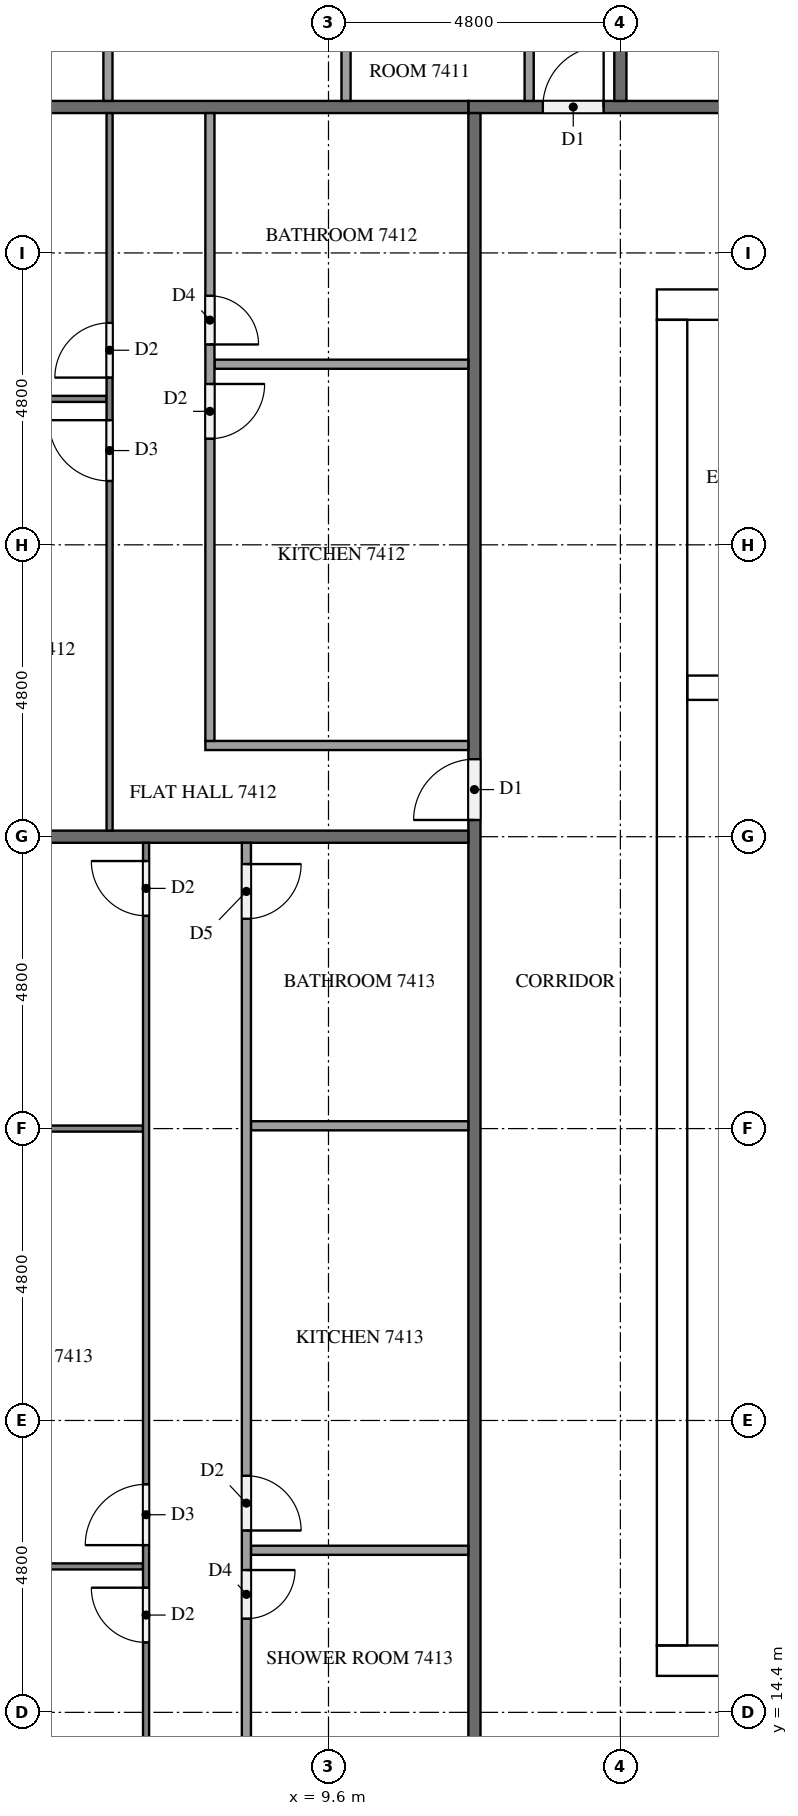
"""IFC4 building model, lengths in metres.
Left out: names, types, materials, properties, quantities, classifications, styles, units other than length and angle.
Written with IfcOpenShell. Run it as: python <this file> out.ifc"""

import sys

from ifc_helpers import new_model, si_unit, direction, frame, frame_2d, origin, place, context, subcontext, project, spatial, rectangle, extrude, element, fill, save


model = new_model("IFC4")
c1 = context("Model", 3, precision=1e-05, world=origin(), true_north=direction((0.0, 1.0)))
c2 = subcontext(c1, "Body", "Model", "MODEL_VIEW")
j1 = project(units=[si_unit("LENGTHUNIT", "METRE"), si_unit("PLANEANGLEUNIT", "RADIAN")], contexts=[c1])
p1 = place(None, origin())
s1 = spatial("IfcSite", under=j1, at=p1, CompositionType="ELEMENT")
p2 = place(p1, origin())
s2 = spatial("IfcBuilding", under=s1, at=p2, CompositionType="ELEMENT")
p3 = place(p2, frame((0.0, 0.0, 282.6)))
s3 = spatial("IfcBuildingStorey", under=s2, at=p3, CompositionType="ELEMENT", Elevation=282.6)
p4 = place(p3, frame((15.0, 15.25, 0.0), z_axis=(0.0, 0.0, 1.0), x_axis=(1.0, 0.0, 0.0)))
e1 = element("IfcWall", 1, at=p4, inside=s3, PredefinedType="SHEAR", context=c2, shape_type="SweptSolid", body=[
    extrude(rectangle(XDim=32.4, YDim=0.5, at=frame_2d((16.2, 0.0))), origin(), (0.0, 0.0, 1.0), 3.2),
])
p5 = place(p4, frame((15.3, 0.0, 0.0)))
e2 = element("IfcOpeningElement", 2, at=p5, cuts=e1, PredefinedType="OPENING", context=c2, shape_type="SweptSolid", body=[
    extrude(rectangle(XDim=1.8, YDim=2.1, at=frame_2d((0.9, 1.05))), frame((0.0, 0.26, 0.0), z_axis=(0.0, -1.0, 0.0), x_axis=(1.0, 0.0, 0.0)), (0.0, 0.0, 1.0), 0.52),
])
p6 = place(p3, frame((15.0, 37.55, 0.0), z_axis=(0.0, 0.0, 1.0), x_axis=(1.0, 0.0, 0.0)))
e3 = element("IfcWall", 3, at=p6, inside=s3, PredefinedType="SHEAR", context=c2, shape_type="SweptSolid", body=[
    extrude(rectangle(XDim=32.4, YDim=0.5, at=frame_2d((16.2, 0.0))), origin(), (0.0, 0.0, 1.0), 3.2),
])
p7 = place(p6, frame((15.3, 0.0, 0.0)))
e4 = element("IfcOpeningElement", 4, at=p7, cuts=e3, PredefinedType="OPENING", context=c2, shape_type="SweptSolid", body=[
    extrude(rectangle(XDim=1.8, YDim=2.1, at=frame_2d((0.9, 1.05))), frame((0.0, 0.26, 0.0), z_axis=(0.0, -1.0, 0.0), x_axis=(1.0, 0.0, 0.0)), (0.0, 0.0, 1.0), 0.52),
])
p8 = place(p6, frame((1.282, 0.0, 0.0)))
e5 = element("IfcOpeningElement", 5, at=p8, cuts=e3, PredefinedType="OPENING", context=c2, shape_type="SweptSolid", body=[
    extrude(rectangle(XDim=1.0, YDim=2.1, at=frame_2d((0.5, 1.05))), frame((0.0, 0.26, 0.0), z_axis=(0.0, -1.0, 0.0), x_axis=(1.0, 0.0, 0.0)), (0.0, 0.0, 1.0), 0.52),
])
p9 = place(p6, frame((5.082, 0.0, 0.0)))
e6 = element("IfcOpeningElement", 6, at=p9, cuts=e3, PredefinedType="OPENING", context=c2, shape_type="SweptSolid", body=[
    extrude(rectangle(XDim=1.0, YDim=2.1, at=frame_2d((0.5, 1.05))), frame((0.0, 0.26, 0.0), z_axis=(0.0, -1.0, 0.0), x_axis=(1.0, 0.0, 0.0)), (0.0, 0.0, 1.0), 0.52),
])
p10 = place(p3, frame((15.25, 15.5, 0.0), z_axis=(0.0, 0.0, 1.0), x_axis=(0.0, 1.0, 0.0)))
e7 = element("IfcWall", 7, at=p10, inside=s3, PredefinedType="SHEAR", context=c2, shape_type="SweptSolid", body=[
    extrude(rectangle(XDim=21.8, YDim=0.5, at=frame_2d((10.9, 0.0))), origin(), (0.0, 0.0, 1.0), 3.2),
])
p11 = place(p10, frame((5.26, 0.0, 0.0)))
e8 = element("IfcOpeningElement", 8, at=p11, cuts=e7, PredefinedType="OPENING", context=c2, shape_type="SweptSolid", body=[
    extrude(rectangle(XDim=1.2, YDim=2.1, at=frame_2d((0.6, 1.05))), frame((0.0, 0.26, 0.0), z_axis=(0.0, -1.0, 0.0), x_axis=(1.0, 0.0, 0.0)), (0.0, 0.0, 1.0), 0.52),
])
p12 = place(p3, frame((15.5, 31.25, 0.0), z_axis=(0.0, 0.0, 1.0), x_axis=(1.0, 0.0, 0.0)))
e9 = element("IfcWall", 9, at=p12, inside=s3, PredefinedType="SHEAR", context=c2, shape_type="SweptSolid", body=[
    extrude(rectangle(XDim=7.4, YDim=0.4, at=frame_2d((3.7, 0.0))), origin(), (0.0, 0.0, 1.0), 3.2),
])
p13 = place(p3, frame((11.9, 40.8, 0.0), z_axis=(0.0, 0.0, 1.0), x_axis=(1.0, 0.0, 0.0)))
e10 = element("IfcWall", 10, at=p13, inside=s3, PredefinedType="PARTITIONING", context=c2, shape_type="SweptSolid", body=[
    extrude(rectangle(XDim=38.6, YDim=0.2, at=frame_2d((19.3, 0.0))), origin(), (0.0, 0.0, 1.0), 3.2),
])
p14 = place(p13, frame((33.975, 0.0, 0.0)))
e11 = element("IfcOpeningElement", 11, at=p14, cuts=e10, PredefinedType="OPENING", context=c2, shape_type="SweptSolid", body=[
    extrude(rectangle(XDim=1.0, YDim=2.1, at=frame_2d((0.5, 1.05))), frame((0.0, 0.11, 0.0), z_axis=(0.0, -1.0, 0.0), x_axis=(1.0, 0.0, 0.0)), (0.0, 0.0, 1.0), 0.22),
])
p15 = place(p13, frame((14.725, 0.0, 0.0)))
e12 = element("IfcOpeningElement", 12, at=p15, cuts=e10, PredefinedType="OPENING", context=c2, shape_type="SweptSolid", body=[
    extrude(rectangle(XDim=1.1, YDim=2.1, at=frame_2d((0.55, 1.05))), frame((0.0, 0.11, 0.0), z_axis=(0.0, -1.0, 0.0), x_axis=(1.0, 0.0, 0.0)), (0.0, 0.0, 1.0), 0.22),
])
p16 = place(p13, frame((13.225, 0.0, 0.0)))
e13 = element("IfcOpeningElement", 13, at=p16, cuts=e10, PredefinedType="OPENING", context=c2, shape_type="SweptSolid", body=[
    extrude(rectangle(XDim=1.0, YDim=2.1, at=frame_2d((0.5, 1.05))), frame((0.0, 0.11, 0.0), z_axis=(0.0, -1.0, 0.0), x_axis=(1.0, 0.0, 0.0)), (0.0, 0.0, 1.0), 0.22),
])
p17 = place(p13, frame((1.225, 0.0, 0.0)))
e14 = element("IfcOpeningElement", 14, at=p17, cuts=e10, PredefinedType="OPENING", context=c2, shape_type="SweptSolid", body=[
    extrude(rectangle(XDim=1.0, YDim=2.1, at=frame_2d((0.5, 1.05))), frame((0.0, 0.11, 0.0), z_axis=(0.0, -1.0, 0.0), x_axis=(1.0, 0.0, 0.0)), (0.0, 0.0, 1.0), 0.22),
])
p18 = place(p3, frame((12.0, 12.1, 0.0), z_axis=(0.0, 0.0, 1.0), x_axis=(0.0, 1.0, 0.0)))
e15 = element("IfcWall", 15, at=p18, inside=s3, PredefinedType="PARTITIONING", context=c2, shape_type="SweptSolid", body=[
    extrude(rectangle(XDim=28.6, YDim=0.2, at=frame_2d((14.3, 0.0))), origin(), (0.0, 0.0, 1.0), 3.2),
])
p19 = place(p18, frame((16.975, 0.0, 0.0)))
e16 = element("IfcOpeningElement", 16, at=p19, cuts=e15, PredefinedType="OPENING", context=c2, shape_type="SweptSolid", body=[
    extrude(rectangle(XDim=1.0, YDim=2.1, at=frame_2d((0.5, 1.05))), frame((0.0, 0.11, 0.0), z_axis=(0.0, -1.0, 0.0), x_axis=(1.0, 0.0, 0.0)), (0.0, 0.0, 1.0), 0.22),
])
p20 = place(p18, frame((0.175, 0.0, 0.0)))
e17 = element("IfcOpeningElement", 17, at=p20, cuts=e15, PredefinedType="OPENING", context=c2, shape_type="SweptSolid", body=[
    extrude(rectangle(XDim=1.0, YDim=2.1, at=frame_2d((0.5, 1.05))), frame((0.0, 0.11, 0.0), z_axis=(0.0, -1.0, 0.0), x_axis=(1.0, 0.0, 0.0)), (0.0, 0.0, 1.0), 0.22),
])
p21 = place(p3, frame((14.4, 47.75, 0.0), z_axis=(0.0, 0.0, 1.0), x_axis=(0.0, -1.0, 0.0)))
e18 = element("IfcWall", 18, at=p21, inside=s3, PredefinedType="PARTITIONING", context=c2, shape_type="SweptSolid", body=[
    extrude(rectangle(XDim=6.85, YDim=0.2, at=frame_2d((3.425, 0.0))), origin(), (0.0, 0.0, 1.0), 3.2),
])
for number, where, z_axis, x_axis in (
    (19, (0.1, 40.8, 0.0), (0.0, 0.0, 1.0), (1.0, 0.0, 0.0)),
    (20, (0.1, 28.8, 0.0), (0.0, 0.0, 1.0), (1.0, 0.0, 0.0)),
):
    element("IfcWall", number, at=place(p3, frame(where, z_axis=z_axis, x_axis=x_axis)), inside=s3, PredefinedType="PARTITIONING", context=c2, shape_type="SweptSolid", body=[
        extrude(rectangle(XDim=11.8, YDim=0.2, at=frame_2d((5.9, 0.0))), origin(), (0.0, 0.0, 1.0), 3.2),
    ])
for number, where, z_axis, x_axis in (
    (21, (9.888, 40.9, 0.0), (0.0, 0.0, 1.0), (0.0, 1.0, 0.0)),
    (22, (5.973, 40.9, 0.0), (0.0, 0.0, 1.0), (0.0, 1.0, 0.0)),
):
    element("IfcWall", number, at=place(p3, frame(where, z_axis=z_axis, x_axis=x_axis)), inside=s3, PredefinedType="PARTITIONING", context=c2, shape_type="SweptSolid", body=[
        extrude(rectangle(XDim=1.925, YDim=0.15, at=frame_2d((0.962, 0.0))), origin(), (0.0, 0.0, 1.0), 3.2),
    ])
p22 = place(p3, frame((12.9, 40.9, 0.0), z_axis=(0.0, 0.0, 1.0), x_axis=(0.0, 1.0, 0.0)))
e23 = element("IfcWall", 23, at=p22, inside=s3, PredefinedType="PARTITIONING", context=c2, shape_type="SweptSolid", body=[
    extrude(rectangle(XDim=2.075, YDim=0.15, at=frame_2d((1.038, 0.0))), origin(), (0.0, 0.0, 1.0), 3.2),
])
p23 = place(p3, frame((5.95, 36.0, 0.0), z_axis=(0.0, 0.0, 1.0), x_axis=(-1.0, 0.0, 0.0)))
e24 = element("IfcWall", 24, at=p23, inside=s3, PredefinedType="PARTITIONING", context=c2, shape_type="SweptSolid", body=[
    extrude(rectangle(XDim=5.85, YDim=0.1, at=frame_2d((2.925, 0.0))), origin(), (0.0, 0.0, 1.0), 3.2),
])
p24 = place(p3, frame((6.0, 28.9, 0.0), z_axis=(0.0, 0.0, 1.0), x_axis=(0.0, 1.0, 0.0)))
e25 = element("IfcWall", 25, at=p24, inside=s3, PredefinedType="PARTITIONING", context=c2, shape_type="SweptSolid", body=[
    extrude(rectangle(XDim=11.8, YDim=0.1, at=frame_2d((5.9, 0.0))), origin(), (0.0, 0.0, 1.0), 3.2),
])
p25 = place(p24, frame((5.75, 0.0, 0.0)))
e26 = element("IfcOpeningElement", 26, at=p25, cuts=e25, PredefinedType="OPENING", context=c2, shape_type="SweptSolid", body=[
    extrude(rectangle(XDim=1.0, YDim=2.1, at=frame_2d((0.5, 1.05))), frame((0.0, 0.06, 0.0), z_axis=(0.0, -1.0, 0.0), x_axis=(1.0, 0.0, 0.0)), (0.0, 0.0, 1.0), 0.12),
])
p26 = place(p24, frame((7.45, 0.0, 0.0)))
e27 = element("IfcOpeningElement", 27, at=p26, cuts=e25, PredefinedType="OPENING", context=c2, shape_type="SweptSolid", body=[
    extrude(rectangle(XDim=0.9, YDim=2.1, at=frame_2d((0.45, 1.05))), frame((0.0, 0.06, 0.0), z_axis=(0.0, -1.0, 0.0), x_axis=(1.0, 0.0, 0.0)), (0.0, 0.0, 1.0), 0.12),
])
p27 = place(p3, frame((11.9, 36.57, 0.0), z_axis=(0.0, 0.0, 1.0), x_axis=(-1.0, 0.0, 0.0)))
e28 = element("IfcWall", 28, at=p27, inside=s3, PredefinedType="PARTITIONING", context=c2, shape_type="SweptSolid", body=[
    extrude(rectangle(XDim=4.175, YDim=0.15, at=frame_2d((2.087, 0.0))), origin(), (0.0, 0.0, 1.0), 3.2),
])
p28 = place(p3, frame((11.9, 30.3, 0.0), z_axis=(0.0, 0.0, 1.0), x_axis=(-1.0, 0.0, 0.0)))
e29 = element("IfcWall", 29, at=p28, inside=s3, PredefinedType="PARTITIONING", context=c2, shape_type="SweptSolid", body=[
    extrude(rectangle(XDim=4.325, YDim=0.15, at=frame_2d((2.163, 0.0))), origin(), (0.0, 0.0, 1.0), 3.2),
])
p29 = place(p3, frame((7.65, 40.7, 0.0), z_axis=(0.0, 0.0, 1.0), x_axis=(0.0, -1.0, 0.0)))
e30 = element("IfcWall", 30, at=p29, inside=s3, PredefinedType="PARTITIONING", context=c2, shape_type="SweptSolid", body=[
    extrude(rectangle(XDim=10.325, YDim=0.15, at=frame_2d((5.163, 0.0))), origin(), (0.0, 0.0, 1.0), 3.2),
])
p30 = place(p29, frame((4.455, 0.0, 0.0)))
e31 = element("IfcOpeningElement", 31, at=p30, cuts=e30, PredefinedType="OPENING", context=c2, shape_type="SweptSolid", body=[
    extrude(rectangle(XDim=0.9, YDim=2.1, at=frame_2d((0.45, 1.05))), frame((0.0, 0.085, 0.0), z_axis=(0.0, -1.0, 0.0), x_axis=(1.0, 0.0, 0.0)), (0.0, 0.0, 1.0), 0.17),
])
p31 = place(p29, frame((3.005, 0.0, 0.0)))
e32 = element("IfcOpeningElement", 32, at=p31, cuts=e30, PredefinedType="OPENING", context=c2, shape_type="SweptSolid", body=[
    extrude(rectangle(XDim=0.8, YDim=2.1, at=frame_2d((0.4, 1.05))), frame((0.0, 0.085, 0.0), z_axis=(0.0, -1.0, 0.0), x_axis=(1.0, 0.0, 0.0)), (0.0, 0.0, 1.0), 0.17),
])
p32 = place(p3, frame((6.55, 16.8, 0.0), z_axis=(0.0, 0.0, 1.0), x_axis=(-1.0, 0.0, 0.0)))
e33 = element("IfcWall", 33, at=p32, inside=s3, PredefinedType="PARTITIONING", context=c2, shape_type="SweptSolid", body=[
    extrude(rectangle(XDim=6.45, YDim=0.1, at=frame_2d((3.225, 0.0))), origin(), (0.0, 0.0, 1.0), 3.2),
])
p33 = place(p3, frame((6.55, 24.0, 0.0), z_axis=(0.0, 0.0, 1.0), x_axis=(-1.0, 0.0, 0.0)))
e34 = element("IfcWall", 34, at=p33, inside=s3, PredefinedType="PARTITIONING", context=c2, shape_type="SweptSolid", body=[
    extrude(rectangle(XDim=6.3, YDim=0.1, at=frame_2d((3.15, 0.0))), origin(), (0.0, 0.0, 1.0), 3.2),
])
p34 = place(p3, frame((6.6, 12.1, 0.0), z_axis=(0.0, 0.0, 1.0), x_axis=(0.0, 1.0, 0.0)))
e35 = element("IfcWall", 35, at=p34, inside=s3, PredefinedType="PARTITIONING", context=c2, shape_type="SweptSolid", body=[
    extrude(rectangle(XDim=16.6, YDim=0.1, at=frame_2d((8.3, 0.0))), origin(), (0.0, 0.0, 1.0), 3.2),
])
p35 = place(p34, frame((3.45, 0.0, 0.0)))
e36 = element("IfcOpeningElement", 36, at=p35, cuts=e35, PredefinedType="OPENING", context=c2, shape_type="SweptSolid", body=[
    extrude(rectangle(XDim=0.9, YDim=2.1, at=frame_2d((0.45, 1.05))), frame((0.0, 0.06, 0.0), z_axis=(0.0, -1.0, 0.0), x_axis=(1.0, 0.0, 0.0)), (0.0, 0.0, 1.0), 0.12),
])
p36 = place(p34, frame((5.05, 0.0, 0.0)))
e37 = element("IfcOpeningElement", 37, at=p36, cuts=e35, PredefinedType="OPENING", context=c2, shape_type="SweptSolid", body=[
    extrude(rectangle(XDim=1.0, YDim=2.1, at=frame_2d((0.5, 1.05))), frame((0.0, 0.06, 0.0), z_axis=(0.0, -1.0, 0.0), x_axis=(1.0, 0.0, 0.0)), (0.0, 0.0, 1.0), 0.12),
])
p37 = place(p34, frame((15.4, 0.0, 0.0)))
e38 = element("IfcOpeningElement", 38, at=p37, cuts=e35, PredefinedType="OPENING", context=c2, shape_type="SweptSolid", body=[
    extrude(rectangle(XDim=0.9, YDim=2.1, at=frame_2d((0.45, 1.05))), frame((0.0, 0.06, 0.0), z_axis=(0.0, -1.0, 0.0), x_axis=(1.0, 0.0, 0.0)), (0.0, 0.0, 1.0), 0.12),
])
for number, where, z_axis, x_axis in (
    (39, (11.9, 17.065, 0.0), (0.0, 0.0, 1.0), (-1.0, 0.0, 0.0)),
    (40, (11.9, 24.046, 0.0), (0.0, 0.0, 1.0), (-1.0, 0.0, 0.0)),
):
    element("IfcWall", number, at=place(p3, frame(where, z_axis=z_axis, x_axis=x_axis)), inside=s3, PredefinedType="PARTITIONING", context=c2, shape_type="SweptSolid", body=[
        extrude(rectangle(XDim=3.575, YDim=0.15, at=frame_2d((1.788, 0.0))), origin(), (0.0, 0.0, 1.0), 3.2),
    ])
p38 = place(p3, frame((8.25, 28.7, 0.0), z_axis=(0.0, 0.0, 1.0), x_axis=(0.0, -1.0, 0.0)))
e41 = element("IfcWall", 41, at=p38, inside=s3, PredefinedType="PARTITIONING", context=c2, shape_type="SweptSolid", body=[
    extrude(rectangle(XDim=15.125, YDim=0.15, at=frame_2d((7.562, 0.0))), origin(), (0.0, 0.0, 1.0), 3.2),
])
p39 = place(p38, frame((11.96, 0.0, 0.0)))
e42 = element("IfcOpeningElement", 42, at=p39, cuts=e41, PredefinedType="OPENING", context=c2, shape_type="SweptSolid", body=[
    extrude(rectangle(XDim=0.8, YDim=2.1, at=frame_2d((0.4, 1.05))), frame((0.0, 0.085, 0.0), z_axis=(0.0, -1.0, 0.0), x_axis=(1.0, 0.0, 0.0)), (0.0, 0.0, 1.0), 0.17),
])
p40 = place(p38, frame((10.41, 0.0, 0.0)))
e43 = element("IfcOpeningElement", 43, at=p40, cuts=e41, PredefinedType="OPENING", context=c2, shape_type="SweptSolid", body=[
    extrude(rectangle(XDim=0.9, YDim=2.1, at=frame_2d((0.45, 1.05))), frame((0.0, 0.085, 0.0), z_axis=(0.0, -1.0, 0.0), x_axis=(1.0, 0.0, 0.0)), (0.0, 0.0, 1.0), 0.17),
])
p41 = place(p38, frame((0.35, 0.0, 0.0)))
e44 = element("IfcOpeningElement", 44, at=p41, cuts=e41, PredefinedType="OPENING", context=c2, shape_type="SweptSolid", body=[
    extrude(rectangle(XDim=0.9, YDim=2.1, at=frame_2d((0.45, 1.05))), frame((0.0, 0.085, 0.0), z_axis=(0.0, -1.0, 0.0), x_axis=(1.0, 0.0, 0.0)), (0.0, 0.0, 1.0), 0.17),
])
p42 = place(p11, frame((1.2, 0.0, 0.0), z_axis=(0.0, 0.0, 1.0), x_axis=(-1.0, 0.0, 0.0)))
e45 = element("IfcDoor", 45, at=p42, inside=s3, OperationType="SINGLE_SWING_LEFT", PredefinedType="DOOR", context=c2, shape_type="SweptSolid", body=[
    extrude(rectangle(XDim=1.2, YDim=2.1, at=frame_2d((0.6, 1.05))), frame((0.0, 0.025, 0.0), z_axis=(0.0, -1.0, 0.0), x_axis=(1.0, 0.0, 0.0)), (0.0, 0.0, 1.0), 0.05),
])
fill(e8, e45)
p43 = place(p17, origin())
e46 = element("IfcDoor", 46, at=p43, inside=s3, OperationType="SINGLE_SWING_RIGHT", PredefinedType="DOOR", context=c2, shape_type="SweptSolid", body=[
    extrude(rectangle(XDim=1.0, YDim=2.1, at=frame_2d((0.5, 1.05))), frame((0.0, 0.025, 0.0), z_axis=(0.0, -1.0, 0.0), x_axis=(1.0, 0.0, 0.0)), (0.0, 0.0, 1.0), 0.05),
])
fill(e14, e46)
p44 = place(p19, origin())
e47 = element("IfcDoor", 47, at=p44, inside=s3, OperationType="SINGLE_SWING_LEFT", PredefinedType="DOOR", context=c2, shape_type="SweptSolid", body=[
    extrude(rectangle(XDim=1.0, YDim=2.1, at=frame_2d((0.5, 1.05))), frame((0.0, 0.025, 0.0), z_axis=(0.0, -1.0, 0.0), x_axis=(1.0, 0.0, 0.0)), (0.0, 0.0, 1.0), 0.05),
])
fill(e16, e47)
p45 = place(p25, origin())
e48 = element("IfcDoor", 48, at=p45, inside=s3, OperationType="SINGLE_SWING_RIGHT", PredefinedType="DOOR", context=c2, shape_type="SweptSolid", body=[
    extrude(rectangle(XDim=1.0, YDim=2.1, at=frame_2d((0.5, 1.05))), frame((0.0, 0.025, 0.0), z_axis=(0.0, -1.0, 0.0), x_axis=(1.0, 0.0, 0.0)), (0.0, 0.0, 1.0), 0.05),
])
fill(e26, e48)
p46 = place(p26, origin())
e49 = element("IfcDoor", 49, at=p46, inside=s3, OperationType="SINGLE_SWING_LEFT", PredefinedType="DOOR", context=c2, shape_type="SweptSolid", body=[
    extrude(rectangle(XDim=0.9, YDim=2.1, at=frame_2d((0.45, 1.05))), frame((0.0, 0.025, 0.0), z_axis=(0.0, -1.0, 0.0), x_axis=(1.0, 0.0, 0.0)), (0.0, 0.0, 1.0), 0.05),
])
fill(e27, e49)
p47 = place(p30, origin())
e50 = element("IfcDoor", 50, at=p47, inside=s3, OperationType="SINGLE_SWING_LEFT", PredefinedType="DOOR", context=c2, shape_type="SweptSolid", body=[
    extrude(rectangle(XDim=0.9, YDim=2.1, at=frame_2d((0.45, 1.05))), frame((0.0, 0.025, 0.0), z_axis=(0.0, -1.0, 0.0), x_axis=(1.0, 0.0, 0.0)), (0.0, 0.0, 1.0), 0.05),
])
fill(e31, e50)
p48 = place(p31, origin())
e51 = element("IfcDoor", 51, at=p48, inside=s3, OperationType="SINGLE_SWING_RIGHT", PredefinedType="DOOR", context=c2, shape_type="SweptSolid", body=[
    extrude(rectangle(XDim=0.8, YDim=2.1, at=frame_2d((0.4, 1.05))), frame((0.0, 0.025, 0.0), z_axis=(0.0, -1.0, 0.0), x_axis=(1.0, 0.0, 0.0)), (0.0, 0.0, 1.0), 0.05),
])
fill(e32, e51)
p49 = place(p35, origin())
e52 = element("IfcDoor", 52, at=p49, inside=s3, OperationType="SINGLE_SWING_RIGHT", PredefinedType="DOOR", context=c2, shape_type="SweptSolid", body=[
    extrude(rectangle(XDim=0.9, YDim=2.1, at=frame_2d((0.45, 1.05))), frame((0.0, 0.025, 0.0), z_axis=(0.0, -1.0, 0.0), x_axis=(1.0, 0.0, 0.0)), (0.0, 0.0, 1.0), 0.05),
])
fill(e36, e52)
p50 = place(p36, origin())
e53 = element("IfcDoor", 53, at=p50, inside=s3, OperationType="SINGLE_SWING_LEFT", PredefinedType="DOOR", context=c2, shape_type="SweptSolid", body=[
    extrude(rectangle(XDim=1.0, YDim=2.1, at=frame_2d((0.5, 1.05))), frame((0.0, 0.025, 0.0), z_axis=(0.0, -1.0, 0.0), x_axis=(1.0, 0.0, 0.0)), (0.0, 0.0, 1.0), 0.05),
])
fill(e37, e53)
p51 = place(p37, origin())
e54 = element("IfcDoor", 54, at=p51, inside=s3, OperationType="SINGLE_SWING_RIGHT", PredefinedType="DOOR", context=c2, shape_type="SweptSolid", body=[
    extrude(rectangle(XDim=0.9, YDim=2.1, at=frame_2d((0.45, 1.05))), frame((0.0, 0.025, 0.0), z_axis=(0.0, -1.0, 0.0), x_axis=(1.0, 0.0, 0.0)), (0.0, 0.0, 1.0), 0.05),
])
fill(e38, e54)
p52 = place(p39, origin())
e55 = element("IfcDoor", 55, at=p52, inside=s3, OperationType="SINGLE_SWING_LEFT", PredefinedType="DOOR", context=c2, shape_type="SweptSolid", body=[
    extrude(rectangle(XDim=0.8, YDim=2.1, at=frame_2d((0.4, 1.05))), frame((0.0, 0.025, 0.0), z_axis=(0.0, -1.0, 0.0), x_axis=(1.0, 0.0, 0.0)), (0.0, 0.0, 1.0), 0.05),
])
fill(e42, e55)
p53 = place(p40, origin())
e56 = element("IfcDoor", 56, at=p53, inside=s3, OperationType="SINGLE_SWING_RIGHT", PredefinedType="DOOR", context=c2, shape_type="SweptSolid", body=[
    extrude(rectangle(XDim=0.9, YDim=2.1, at=frame_2d((0.45, 1.05))), frame((0.0, 0.025, 0.0), z_axis=(0.0, -1.0, 0.0), x_axis=(1.0, 0.0, 0.0)), (0.0, 0.0, 1.0), 0.05),
])
fill(e43, e56)
p54 = place(p41, origin())
e57 = element("IfcDoor", 57, at=p54, inside=s3, OperationType="SINGLE_SWING_LEFT", PredefinedType="DOOR", context=c2, shape_type="SweptSolid", body=[
    extrude(rectangle(XDim=0.9, YDim=2.1, at=frame_2d((0.45, 1.05))), frame((0.0, 0.025, 0.0), z_axis=(0.0, -1.0, 0.0), x_axis=(1.0, 0.0, 0.0)), (0.0, 0.0, 1.0), 0.05),
])
fill(e44, e57)
save(model, sys.argv[1])
